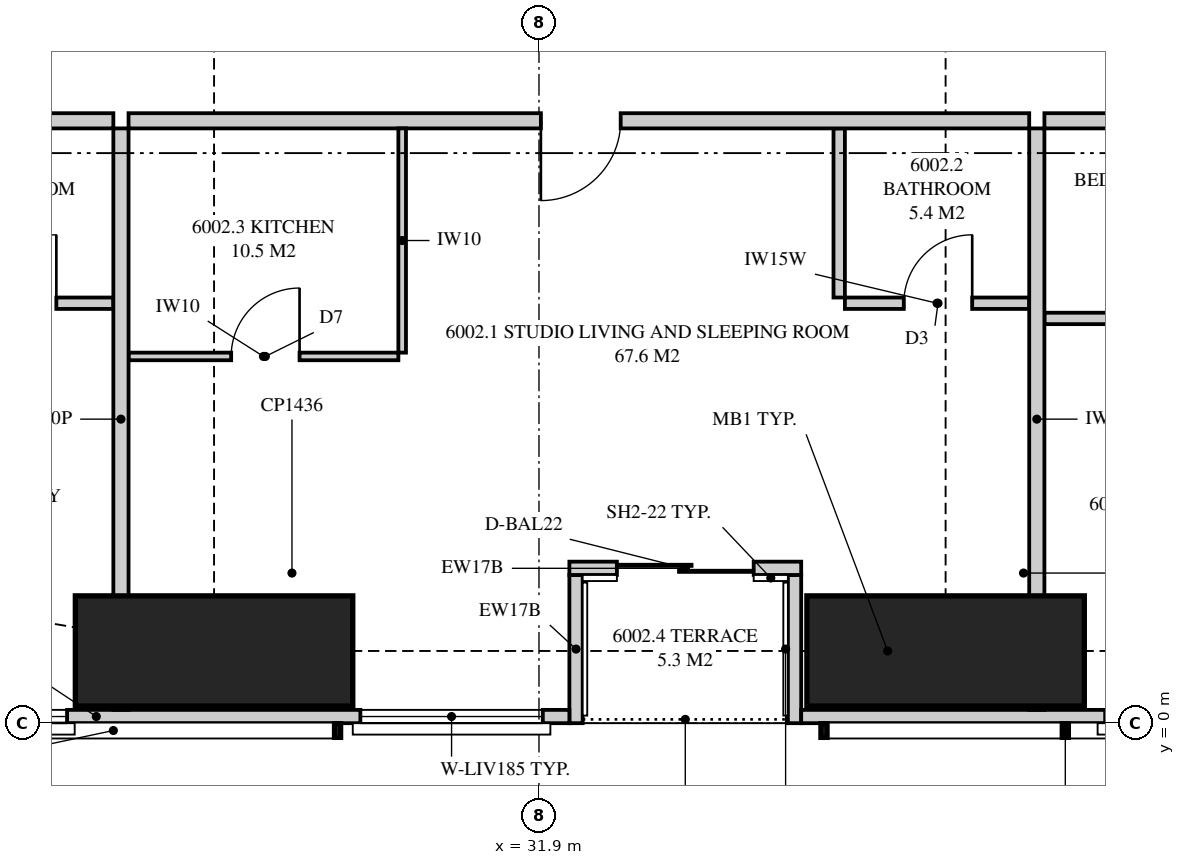
"""IFC4 building model, lengths in metres.
Left out: names, types, materials, properties, quantities, classifications, styles, units other than length and angle.
Written with IfcOpenShell. Run it as: python <this file> out.ifc"""

import sys

from ifc_helpers import new_model, si_unit, direction, frame, frame_2d, origin, origin_2d, place, context, subcontext, project, spatial, polyline, rectangle, outline, extrude, element, fill, save


model = new_model("IFC4")
c1 = context("Model", 3, precision=1e-05, world=origin(), true_north=direction((0.0, 1.0)))
c2 = subcontext(c1, "Body", "Model", "MODEL_VIEW")
j1 = project(units=[si_unit("LENGTHUNIT", "METRE"), si_unit("PLANEANGLEUNIT", "RADIAN")], contexts=[c1])
p1 = place(None, origin())
s1 = spatial("IfcSite", under=j1, at=p1, CompositionType="ELEMENT")
p2 = place(p1, origin())
s2 = spatial("IfcBuilding", under=s1, at=p2, CompositionType="ELEMENT")
p3 = place(p2, frame((0.0, 0.0, 221.45)))
s3 = spatial("IfcBuildingStorey", under=s2, at=p3, CompositionType="ELEMENT", Elevation=221.45)
for number, where, z_axis, x_axis in (
    (1, (27.625, 0.95, 0.0), (0.0, 0.0, 1.0), (0.0, 1.0, 0.0)),
    (2, (37.25, 0.95, 0.0), (0.0, 0.0, 1.0), (0.0, 1.0, 0.0)),
):
    element("IfcColumn", number, at=place(p3, frame(where, z_axis=z_axis, x_axis=x_axis)), inside=s3, PredefinedType="COLUMN", context=c2, shape_type="SweptSolid", body=[
        extrude(rectangle(XDim=1.45, YDim=3.65, at=origin_2d()), origin(), (0.0, 0.0, 1.0), 3.5),
    ])
p4 = place(p3, frame((19.851, 0.087, 0.0), z_axis=(0.0, 0.0, 1.0), x_axis=(1.0, 0.0, 0.0)))
e3 = element("IfcWall", 3, at=p4, inside=s3, PredefinedType="SOLIDWALL", context=c2, shape_type="SweptSolid", body=[
    extrude(outline(polyline([(0.0, 0.0), (12.449, 0.0), (12.449, 2.3), (7.774, 2.3), (7.774, 3.26), (7.642, 3.26), (7.642, 2.3), (7.559, 2.3), (7.559, 3.26), (0.0, 3.26), (0.0, 0.0)])), frame((0.0, 0.087, 0.0), z_axis=(0.0, -1.0, 0.0), x_axis=(1.0, 0.0, 0.0)), (0.0, 0.0, 1.0), 0.175),
])
p5 = place(p4, frame((0.5, 0.0, 0.4)))
e4 = element("IfcOpeningElement", 4, at=p5, cuts=e3, PredefinedType="OPENING", context=c2, shape_type="SweptSolid", body=[
    extrude(rectangle(XDim=2.4, YDim=1.85, at=frame_2d((1.2, 0.925))), frame((0.0, 0.097, 0.0), z_axis=(0.0, -1.0, 0.0), x_axis=(1.0, 0.0, 0.0)), (0.0, 0.0, 1.0), 0.195),
])
p6 = place(p4, frame((4.04, 0.0, 0.4)))
e5 = element("IfcOpeningElement", 5, at=p6, cuts=e3, PredefinedType="OPENING", context=c2, shape_type="SweptSolid", body=[
    extrude(rectangle(XDim=1.8, YDim=1.85, at=frame_2d((0.9, 0.925))), frame((0.0, 0.097, 0.0), z_axis=(0.0, -1.0, 0.0), x_axis=(1.0, 0.0, 0.0)), (0.0, 0.0, 1.0), 0.195),
])
p7 = place(p4, frame((9.699, 0.0, 0.4)))
e6 = element("IfcOpeningElement", 6, at=p7, cuts=e3, PredefinedType="OPENING", context=c2, shape_type="SweptSolid", body=[
    extrude(rectangle(XDim=2.4, YDim=1.85, at=frame_2d((1.2, 0.925))), frame((0.0, 0.097, 0.0), z_axis=(0.0, -1.0, 0.0), x_axis=(1.0, 0.0, 0.0)), (0.0, 0.0, 1.0), 0.195),
])
p8 = place(p3, frame((35.35, 0.087, 0.0), z_axis=(0.0, 0.0, 1.0), x_axis=(1.0, 0.0, 0.0)))
e7 = element("IfcWall", 7, at=p8, inside=s3, PredefinedType="SOLIDWALL", context=c2, shape_type="SweptSolid", body=[
    extrude(outline(polyline([(0.0, 0.0), (18.099, 0.0), (18.099, 3.26), (11.74, 3.26), (11.74, 2.3), (11.656, 2.3), (11.656, 3.26), (11.525, 3.26), (11.525, 2.3), (0.0, 2.3), (0.0, 0.0)])), frame((0.0, 0.087, 0.0), z_axis=(0.0, -1.0, 0.0), x_axis=(1.0, 0.0, 0.0)), (0.0, 0.0, 1.0), 0.175),
])
p9 = place(p8, frame((4.0, 0.0, 0.4)))
e8 = element("IfcOpeningElement", 8, at=p9, cuts=e7, PredefinedType="OPENING", context=c2, shape_type="SweptSolid", body=[
    extrude(rectangle(XDim=1.8, YDim=1.85, at=frame_2d((0.9, 0.925))), frame((0.0, 0.097, 0.0), z_axis=(0.0, -1.0, 0.0), x_axis=(1.0, 0.0, 0.0)), (0.0, 0.0, 1.0), 0.195),
])
p10 = place(p8, frame((7.6, 0.0, 0.4)))
e9 = element("IfcOpeningElement", 9, at=p10, cuts=e7, PredefinedType="OPENING", context=c2, shape_type="SweptSolid", body=[
    extrude(rectangle(XDim=1.8, YDim=1.85, at=frame_2d((0.9, 0.925))), frame((0.0, 0.097, 0.0), z_axis=(0.0, -1.0, 0.0), x_axis=(1.0, 0.0, 0.0)), (0.0, 0.0, 1.0), 0.195),
])
p11 = place(p8, frame((13.51, 0.0, 0.4)))
e10 = element("IfcOpeningElement", 10, at=p11, cuts=e7, PredefinedType="OPENING", context=c2, shape_type="SweptSolid", body=[
    extrude(rectangle(XDim=2.4, YDim=1.85, at=frame_2d((1.2, 0.925))), frame((0.0, 0.097, 0.0), z_axis=(0.0, -1.0, 0.0), x_axis=(1.0, 0.0, 0.0)), (0.0, 0.0, 1.0), 0.195),
])
p12 = place(p3, frame((32.3, 2.038, 0.0), z_axis=(0.0, 0.0, 1.0), x_axis=(1.0, 0.0, 0.0)))
e11 = element("IfcWall", 11, at=p12, inside=s3, PredefinedType="SOLIDWALL", context=c2, shape_type="SweptSolid", body=[
    extrude(rectangle(XDim=3.05, YDim=0.175, at=frame_2d((1.525, 0.0))), origin(), (0.0, 0.0, 1.0), 3.26),
])
p13 = place(p12, frame((0.625, 0.0, 0.0)))
e12 = element("IfcOpeningElement", 12, at=p13, cuts=e11, PredefinedType="OPENING", context=c2, shape_type="SweptSolid", body=[
    extrude(rectangle(XDim=1.8, YDim=2.25, at=frame_2d((0.9, 1.125))), frame((0.0, 0.097, 0.0), z_axis=(0.0, -1.0, 0.0), x_axis=(1.0, 0.0, 0.0)), (0.0, 0.0, 1.0), 0.195),
])
for number, where, z_axis, x_axis in (
    (13, (32.387, 0.0, 0.0), (0.0, 0.0, 1.0), (0.0, 1.0, 0.0)),
    (14, (35.262, 0.0, 0.0), (0.0, 0.0, 1.0), (0.0, 1.0, 0.0)),
):
    element("IfcWall", number, at=place(p3, frame(where, z_axis=z_axis, x_axis=x_axis)), inside=s3, PredefinedType="SOLIDWALL", context=c2, shape_type="SweptSolid", body=[
        extrude(outline(polyline([(0.0, 0.0), (1.95, 0.0), (1.95, 3.26), (1.75, 3.26), (1.75, 2.3), (0.15, 2.3), (0.15, 3.26), (0.0, 3.26), (0.0, 0.0)])), frame((0.0, 0.087, 0.0), z_axis=(0.0, -1.0, 0.0), x_axis=(1.0, 0.0, 0.0)), (0.0, 0.0, 1.0), 0.175),
    ])
p14 = place(p3, frame((26.4, 0.175, 0.0), z_axis=(0.0, 0.0, 1.0), x_axis=(0.0, 1.0, 0.0)))
e15 = element("IfcWall", 15, at=p14, inside=s3, PredefinedType="PARTITIONING", context=c2, shape_type="SweptSolid", body=[
    extrude(outline(polyline([(0.06, 3.26), (0.0, 3.26), (0.0, 0.0), (0.529, 0.0), (0.529, 0.31), (1.021, 0.31), (1.021, 0.0), (7.65, 0.0), (7.65, 2.66), (1.906, 2.66), (1.906, 2.3), (1.021, 2.3), (1.021, 1.99), (0.529, 1.99), (0.529, 2.3), (0.06, 2.3), (0.06, 3.26)])), frame((0.0, 0.1, 0.0), z_axis=(0.0, -1.0, 0.0), x_axis=(1.0, 0.0, 0.0)), (0.0, 0.0, 1.0), 0.2),
])
p15 = place(p3, frame((18.0, 7.925, 0.0), z_axis=(0.0, 0.0, 1.0), x_axis=(1.0, 0.0, 0.0)))
e16 = element("IfcWall", 16, at=p15, inside=s3, PredefinedType="PARTITIONING", context=c2, shape_type="SweptSolid", body=[
    extrude(outline(polyline([(0.0, 0.0), (8.3, 0.0), (8.3, 3.26), (1.839, 3.26), (1.839, 2.3), (0.0, 2.3), (0.0, 3.26), (0.0, 0.0)])), frame((0.0, 0.1, 0.0), z_axis=(0.0, -1.0, 0.0), x_axis=(1.0, 0.0, 0.0)), (0.0, 0.0, 1.0), 0.2),
])
p16 = place(p15, frame((3.7, 0.0, 0.0)))
e17 = element("IfcOpeningElement", 17, at=p16, cuts=e16, PredefinedType="OPENING", context=c2, shape_type="SweptSolid", body=[
    extrude(rectangle(XDim=1.05, YDim=2.2, at=frame_2d((0.525, 1.1))), frame((0.0, 0.11, 0.0), z_axis=(0.0, -1.0, 0.0), x_axis=(1.0, 0.0, 0.0)), (0.0, 0.0, 1.0), 0.22),
])
p17 = place(p3, frame((23.875, 5.525, 0.0), z_axis=(0.0, 0.0, 1.0), x_axis=(1.0, 0.0, 0.0)))
e18 = element("IfcWall", 18, at=p17, inside=s3, PredefinedType="PLUMBINGWALL", context=c2, shape_type="SweptSolid", body=[
    extrude(rectangle(XDim=2.425, YDim=0.15, at=frame_2d((1.212, 0.0))), origin(), (0.0, 0.0, 1.0), 3.26),
])
p18 = place(p17, frame((0.775, 0.0, 0.0)))
e19 = element("IfcOpeningElement", 19, at=p18, cuts=e18, PredefinedType="OPENING", context=c2, shape_type="SweptSolid", body=[
    extrude(rectangle(XDim=0.9, YDim=2.1, at=frame_2d((0.45, 1.05))), frame((0.0, 0.085, 0.0), z_axis=(0.0, -1.0, 0.0), x_axis=(1.0, 0.0, 0.0)), (0.0, 0.0, 1.0), 0.17),
])
p19 = place(p3, frame((38.45, 0.175, 0.0), z_axis=(0.0, 0.0, 1.0), x_axis=(0.0, 1.0, 0.0)))
e20 = element("IfcWall", 20, at=p19, inside=s3, PredefinedType="PARTITIONING", context=c2, shape_type="SweptSolid", body=[
    extrude(outline(polyline([(0.529, 2.3), (0.0, 2.3), (0.0, 0.0), (0.529, 0.0), (0.529, 0.338), (1.021, 0.338), (1.021, 0.0), (7.65, 0.0), (7.65, 2.66), (1.685, 2.66), (1.685, 2.3), (1.021, 2.3), (1.021, 1.962), (0.529, 1.962), (0.529, 2.3)])), frame((0.0, 0.1, 0.0), z_axis=(0.0, -1.0, 0.0), x_axis=(1.0, 0.0, 0.0)), (0.0, 0.0, 1.0), 0.2),
])
p20 = place(p3, frame((26.5, 7.925, 0.0), z_axis=(0.0, 0.0, 1.0), x_axis=(1.0, 0.0, 0.0)))
e21 = element("IfcWall", 21, at=p20, inside=s3, PredefinedType="PARTITIONING", context=c2, shape_type="SweptSolid", body=[
    extrude(outline(polyline([(0.0, 0.0), (11.85, 0.0), (11.85, 3.26), (11.85, 2.66), (9.44, 2.66), (9.44, 3.26), (2.435, 3.26), (2.435, 2.66), (0.0, 2.66), (0.0, 3.26), (0.0, 0.0)])), frame((0.0, 0.1, 0.0), z_axis=(0.0, -1.0, 0.0), x_axis=(1.0, 0.0, 0.0)), (0.0, 0.0, 1.0), 0.2),
])
p21 = place(p20, frame((5.425, 0.0, 0.0)))
e22 = element("IfcOpeningElement", 22, at=p21, cuts=e21, PredefinedType="OPENING", context=c2, shape_type="SweptSolid", body=[
    extrude(rectangle(XDim=1.05, YDim=2.2, at=frame_2d((0.525, 1.1))), frame((0.0, 0.11, 0.0), z_axis=(0.0, -1.0, 0.0), x_axis=(1.0, 0.0, 0.0)), (0.0, 0.0, 1.0), 0.22),
])
p22 = place(p3, frame((35.925, 5.525, 0.0), z_axis=(0.0, 0.0, 1.0), x_axis=(1.0, 0.0, 0.0)))
e23 = element("IfcWall", 23, at=p22, inside=s3, PredefinedType="PLUMBINGWALL", context=c2, shape_type="SweptSolid", body=[
    extrude(outline(polyline([(0.0, 0.0), (2.425, 0.0), (2.425, 3.26), (2.425, 2.66), (0.04, 2.66), (0.04, 3.26), (0.0, 3.26), (0.0, 0.0)])), frame((0.0, 0.075, 0.0), z_axis=(0.0, -1.0, 0.0), x_axis=(1.0, 0.0, 0.0)), (0.0, 0.0, 1.0), 0.15),
])
p23 = place(p22, frame((0.775, 0.0, 0.0)))
e24 = element("IfcOpeningElement", 24, at=p23, cuts=e23, PredefinedType="OPENING", context=c2, shape_type="SweptSolid", body=[
    extrude(rectangle(XDim=0.9, YDim=2.1, at=frame_2d((0.45, 1.05))), frame((0.0, 0.085, 0.0), z_axis=(0.0, -1.0, 0.0), x_axis=(1.0, 0.0, 0.0)), (0.0, 0.0, 1.0), 0.17),
])
p24 = place(p3, frame((35.85, 5.6, 0.0), z_axis=(0.0, 0.0, 1.0), x_axis=(0.0, 1.0, 0.0)))
e25 = element("IfcWall", 25, at=p24, inside=s3, PredefinedType="PLUMBINGWALL", context=c2, shape_type="SweptSolid", body=[
    extrude(rectangle(XDim=2.225, YDim=0.15, at=frame_2d((1.112, 0.0))), origin(), (0.0, 0.0, 1.0), 3.26),
])
p25 = place(p3, frame((26.5, 4.825, 0.0), z_axis=(0.0, 0.0, 1.0), x_axis=(1.0, 0.0, 0.0)))
e26 = element("IfcWall", 26, at=p25, inside=s3, PredefinedType="PARTITIONING", context=c2, shape_type="SweptSolid", body=[
    extrude(outline(polyline([(0.0, 0.0), (3.55, 0.0), (3.55, 3.26), (2.385, 3.26), (2.385, 2.66), (0.0, 2.66), (0.0, 3.26), (0.0, 0.0)])), frame((0.0, 0.05, 0.0), z_axis=(0.0, -1.0, 0.0), x_axis=(1.0, 0.0, 0.0)), (0.0, 0.0, 1.0), 0.1),
])
p26 = place(p25, frame((1.35, 0.0, 0.0)))
e27 = element("IfcOpeningElement", 27, at=p26, cuts=e26, PredefinedType="OPENING", context=c2, shape_type="SweptSolid", body=[
    extrude(rectangle(XDim=0.9, YDim=2.1, at=frame_2d((0.45, 1.05))), frame((0.0, 0.06, 0.0), z_axis=(0.0, -1.0, 0.0), x_axis=(1.0, 0.0, 0.0)), (0.0, 0.0, 1.0), 0.12),
])
p27 = place(p3, frame((30.1, 4.875, 0.0), z_axis=(0.0, 0.0, 1.0), x_axis=(0.0, 1.0, 0.0)))
e28 = element("IfcWall", 28, at=p27, inside=s3, PredefinedType="PARTITIONING", context=c2, shape_type="SweptSolid", body=[
    extrude(rectangle(XDim=2.95, YDim=0.1, at=frame_2d((1.475, 0.0))), origin(), (0.0, 0.0, 1.0), 3.26),
])
p28 = place(p3, frame((38.55, 7.925, 0.0), z_axis=(0.0, 0.0, 1.0), x_axis=(1.0, 0.0, 0.0)))
e29 = element("IfcWall", 29, at=p28, inside=s3, PredefinedType="PARTITIONING", context=c2, shape_type="SweptSolid", body=[
    extrude(outline(polyline([(0.0, 0.0), (7.325, 0.0), (7.325, 3.26), (7.325, 2.66), (7.015, 2.66), (7.015, 3.26), (0.01, 3.26), (0.01, 2.66), (0.0, 2.66), (0.0, 3.26), (0.0, 0.0)])), frame((0.0, 0.1, 0.0), z_axis=(0.0, -1.0, 0.0), x_axis=(1.0, 0.0, 0.0)), (0.0, 0.0, 1.0), 0.2),
])
p29 = place(p28, frame((6.125, 0.0, 0.0)))
e30 = element("IfcOpeningElement", 30, at=p29, cuts=e29, PredefinedType="OPENING", context=c2, shape_type="SweptSolid", body=[
    extrude(rectangle(XDim=1.05, YDim=2.2, at=frame_2d((0.525, 1.1))), frame((0.0, 0.11, 0.0), z_axis=(0.0, -1.0, 0.0), x_axis=(1.0, 0.0, 0.0)), (0.0, 0.0, 1.0), 0.22),
])
p30 = place(p3, frame((38.55, 5.325, 0.0), z_axis=(0.0, 0.0, 1.0), x_axis=(1.0, 0.0, 0.0)))
e31 = element("IfcWall", 31, at=p30, inside=s3, PredefinedType="PLUMBINGWALL", context=c2, shape_type="SweptSolid", body=[
    extrude(rectangle(XDim=3.45, YDim=0.15, at=frame_2d((1.725, 0.0))), origin(), (0.0, 0.0, 1.0), 3.26),
])
p31 = place(p30, frame((2.15, 0.0, 0.0)))
e32 = element("IfcOpeningElement", 32, at=p31, cuts=e31, PredefinedType="OPENING", context=c2, shape_type="SweptSolid", body=[
    extrude(rectangle(XDim=0.9, YDim=2.1, at=frame_2d((0.45, 1.05))), frame((0.0, 0.085, 0.0), z_axis=(0.0, -1.0, 0.0), x_axis=(1.0, 0.0, 0.0)), (0.0, 0.0, 1.0), 0.17),
])
p32 = place(p6, origin())
e33 = element("IfcWindow", 33, at=p32, inside=s3, PartitioningType="SINGLE_PANEL", PredefinedType="WINDOW", context=c2, shape_type="SweptSolid", body=[
    extrude(rectangle(XDim=1.8, YDim=1.85, at=frame_2d((0.9, 0.925))), frame((0.0, 0.03, 0.0), z_axis=(0.0, -1.0, 0.0), x_axis=(1.0, 0.0, 0.0)), (0.0, 0.0, 1.0), 0.06),
])
fill(e5, e33)
p33 = place(p13, origin())
e34 = element("IfcDoor", 34, at=p33, inside=s3, OperationType="SLIDING_TO_LEFT", PredefinedType="DOOR", context=c2, shape_type="SweptSolid", body=[
    extrude(rectangle(XDim=1.8, YDim=2.25, at=frame_2d((0.9, 1.125))), frame((0.0, 0.025, 0.0), z_axis=(0.0, -1.0, 0.0), x_axis=(1.0, 0.0, 0.0)), (0.0, 0.0, 1.0), 0.05),
])
fill(e12, e34)
p34 = place(p7, origin())
e35 = element("IfcWindow", 35, at=p34, inside=s3, PartitioningType="SINGLE_PANEL", PredefinedType="WINDOW", context=c2, shape_type="SweptSolid", body=[
    extrude(rectangle(XDim=2.4, YDim=1.85, at=frame_2d((1.2, 0.925))), frame((0.0, 0.03, 0.0), z_axis=(0.0, -1.0, 0.0), x_axis=(1.0, 0.0, 0.0)), (0.0, 0.0, 1.0), 0.06),
])
fill(e6, e35)
p35 = place(p9, origin())
e36 = element("IfcWindow", 36, at=p35, inside=s3, PartitioningType="SINGLE_PANEL", PredefinedType="WINDOW", context=c2, shape_type="SweptSolid", body=[
    extrude(rectangle(XDim=1.8, YDim=1.85, at=frame_2d((0.9, 0.925))), frame((0.0, 0.03, 0.0), z_axis=(0.0, -1.0, 0.0), x_axis=(1.0, 0.0, 0.0)), (0.0, 0.0, 1.0), 0.06),
])
fill(e8, e36)
p36 = place(p18, origin())
e37 = element("IfcDoor", 37, at=p36, inside=s3, OperationType="SINGLE_SWING_RIGHT", PredefinedType="DOOR", context=c2, shape_type="SweptSolid", body=[
    extrude(rectangle(XDim=0.9, YDim=2.1, at=frame_2d((0.45, 1.05))), frame((0.0, 0.025, 0.0), z_axis=(0.0, -1.0, 0.0), x_axis=(1.0, 0.0, 0.0)), (0.0, 0.0, 1.0), 0.05),
])
fill(e19, e37)
p37 = place(p21, frame((1.05, 0.0, 0.0), z_axis=(0.0, 0.0, 1.0), x_axis=(-1.0, 0.0, 0.0)))
e38 = element("IfcDoor", 38, at=p37, inside=s3, OperationType="SINGLE_SWING_RIGHT", PredefinedType="DOOR", context=c2, shape_type="SweptSolid", body=[
    extrude(rectangle(XDim=1.05, YDim=2.2, at=frame_2d((0.525, 1.1))), frame((0.0, 0.025, 0.0), z_axis=(0.0, -1.0, 0.0), x_axis=(1.0, 0.0, 0.0)), (0.0, 0.0, 1.0), 0.05),
])
fill(e22, e38)
p38 = place(p23, origin())
e39 = element("IfcDoor", 39, at=p38, inside=s3, OperationType="SINGLE_SWING_RIGHT", PredefinedType="DOOR", context=c2, shape_type="SweptSolid", body=[
    extrude(rectangle(XDim=0.9, YDim=2.1, at=frame_2d((0.45, 1.05))), frame((0.0, 0.025, 0.0), z_axis=(0.0, -1.0, 0.0), x_axis=(1.0, 0.0, 0.0)), (0.0, 0.0, 1.0), 0.05),
])
fill(e24, e39)
p39 = place(p26, origin())
e40 = element("IfcDoor", 40, at=p39, inside=s3, OperationType="SINGLE_SWING_RIGHT", PredefinedType="DOOR", context=c2, shape_type="SweptSolid", body=[
    extrude(rectangle(XDim=0.9, YDim=2.1, at=frame_2d((0.45, 1.05))), frame((0.0, 0.025, 0.0), z_axis=(0.0, -1.0, 0.0), x_axis=(1.0, 0.0, 0.0)), (0.0, 0.0, 1.0), 0.05),
])
fill(e27, e40)
save(model, sys.argv[1])
